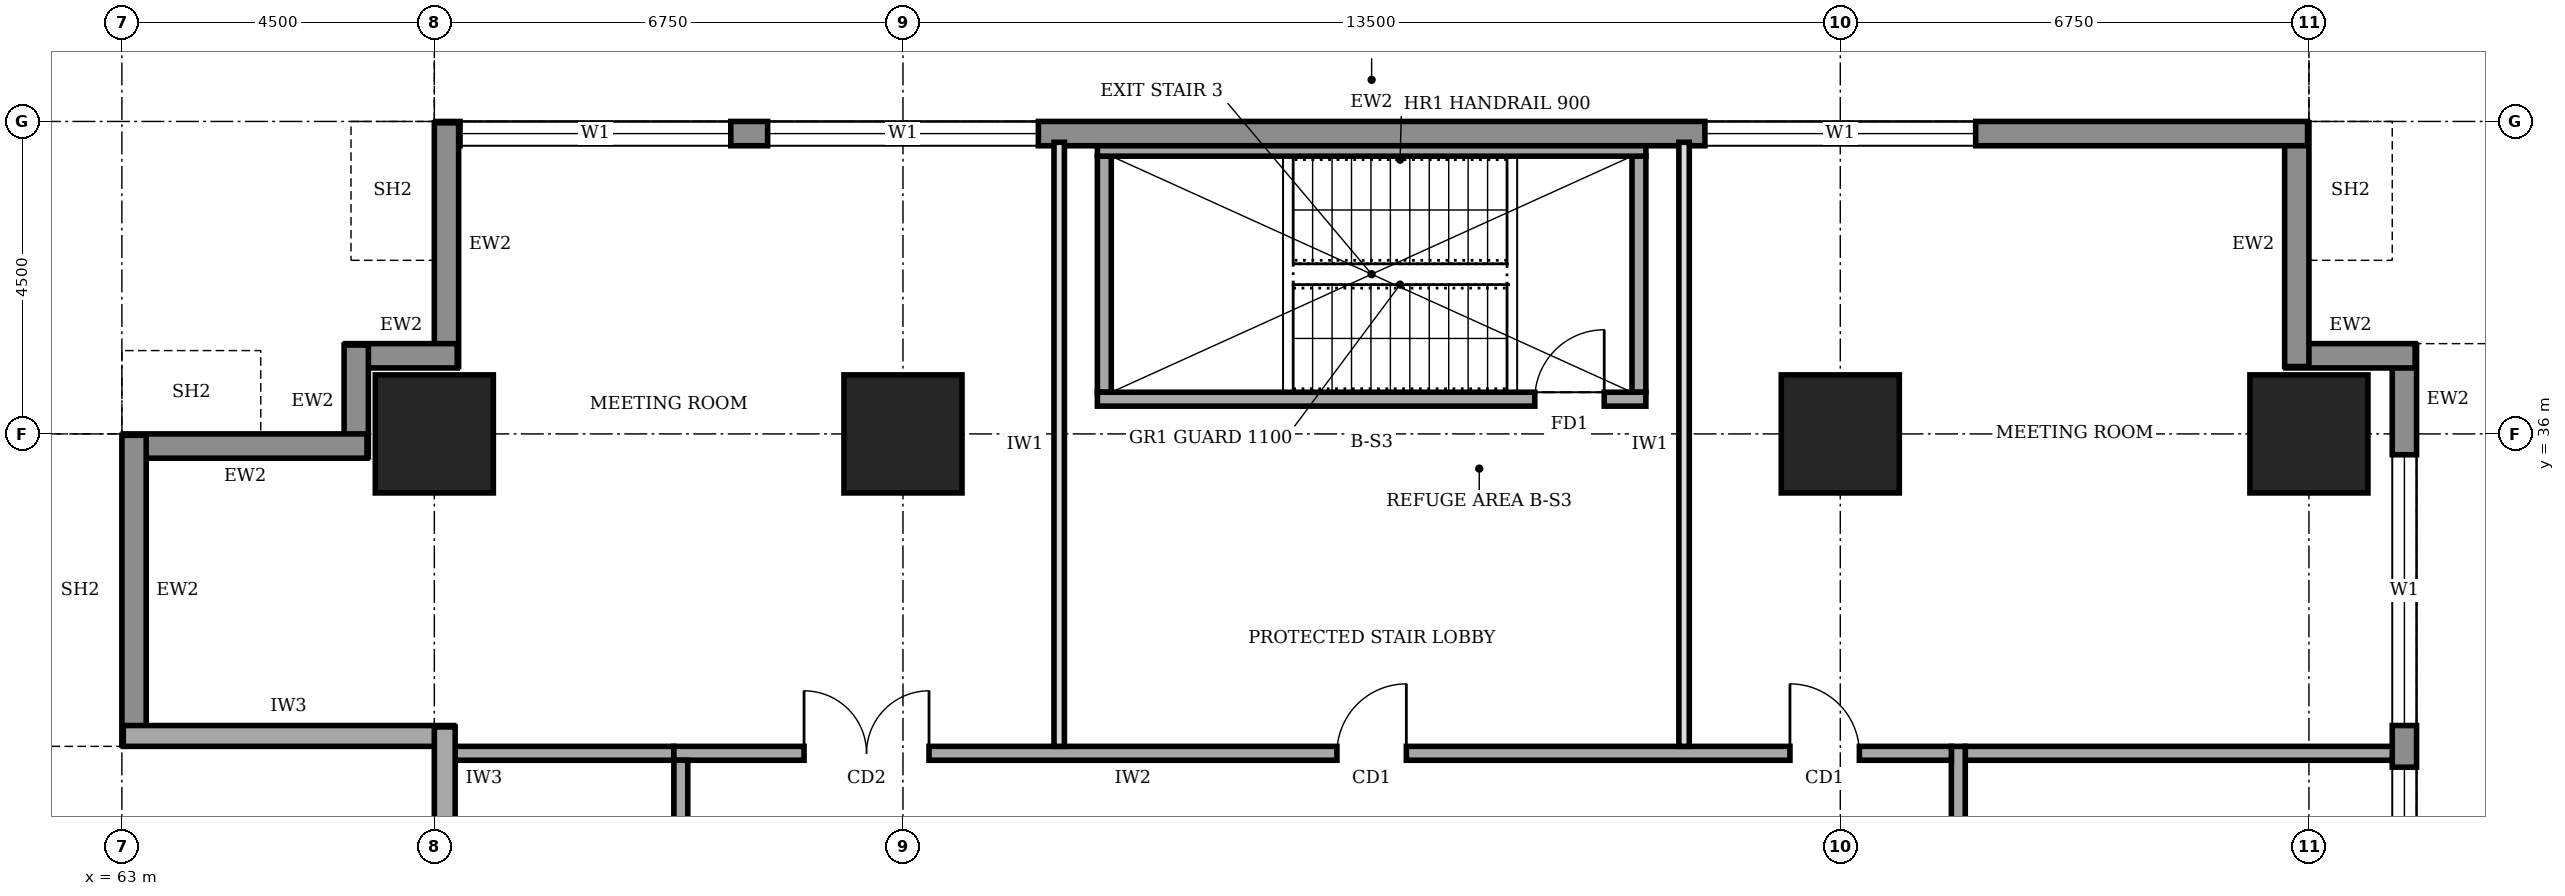
"""IFC4 building model, lengths in metres.
Left out: names, types, materials, properties, quantities, classifications, styles, units other than length and angle.
Written with IfcOpenShell. Run it as: python <this file> out.ifc"""

import sys

from ifc_helpers import new_model, si_unit, direction, frame, frame_2d, origin, origin_2d, place, context, subcontext, project, spatial, rectangle, extrude, element, fill, save


model = new_model("IFC4")
c1 = context("Model", 3, precision=1e-05, world=origin(), true_north=direction((0.0, 1.0)))
c2 = subcontext(c1, "Body", "Model", "MODEL_VIEW")
j1 = project(units=[si_unit("LENGTHUNIT", "METRE"), si_unit("PLANEANGLEUNIT", "RADIAN")], contexts=[c1])
p1 = place(None, origin())
s1 = spatial("IfcSite", under=j1, at=p1, CompositionType="ELEMENT")
p2 = place(p1, origin())
s2 = spatial("IfcBuilding", under=s1, at=p2, CompositionType="ELEMENT")
p3 = place(p2, frame((0.0, 0.0, 121.0)))
s3 = spatial("IfcBuildingStorey", under=s2, at=p3, CompositionType="ELEMENT", Elevation=121.0)
for number, where, z_axis, x_axis in (
    (1, (67.5, 36.0, 0.0), (0.0, 0.0, 1.0), (1.0, 0.0, 0.0)),
    (2, (74.25, 36.0, 0.0), (0.0, 0.0, 1.0), (1.0, 0.0, 0.0)),
    (3, (87.75, 36.0, 0.0), (0.0, 0.0, 1.0), (1.0, 0.0, 0.0)),
    (4, (94.5, 36.0, 0.0), (0.0, 0.0, 1.0), (1.0, 0.0, 0.0)),
):
    element("IfcColumn", number, at=place(p3, frame(where, z_axis=z_axis, x_axis=x_axis)), inside=s3, PredefinedType="COLUMN", context=c2, shape_type="SweptSolid", body=[
        extrude(rectangle(XDim=1.7, YDim=1.7, at=origin_2d()), origin(), (0.0, 0.0, 1.0), 4.0),
    ])
p4 = place(p3, frame((95.875, 3.32, 0.0), z_axis=(0.0, 0.0, 1.0), x_axis=(0.0, 1.0, 0.0)))
e5 = element("IfcWall", 5, at=p4, inside=s3, PredefinedType="STANDARD", context=c2, shape_type="SweptSolid", body=[
    extrude(rectangle(XDim=33.96, YDim=0.35, at=frame_2d((16.98, 0.0))), origin(), (0.0, 0.0, 1.0), 3.75),
])
p5 = place(p4, frame((1.48, 0.0, 0.9)))
e6 = element("IfcOpeningElement", 6, at=p5, cuts=e5, PredefinedType="OPENING", context=c2, shape_type="SweptSolid", body=[
    extrude(rectangle(XDim=3.9, YDim=2.2, at=frame_2d((1.95, 1.1))), frame((0.0, 0.185, 0.0), z_axis=(0.0, -1.0, 0.0), x_axis=(1.0, 0.0, 0.0)), (0.0, 0.0, 1.0), 0.37),
])
p6 = place(p4, frame((5.98, 0.0, 0.9)))
e7 = element("IfcOpeningElement", 7, at=p6, cuts=e5, PredefinedType="OPENING", context=c2, shape_type="SweptSolid", body=[
    extrude(rectangle(XDim=3.9, YDim=2.2, at=frame_2d((1.95, 1.1))), frame((0.0, 0.185, 0.0), z_axis=(0.0, -1.0, 0.0), x_axis=(1.0, 0.0, 0.0)), (0.0, 0.0, 1.0), 0.37),
])
p7 = place(p4, frame((10.48, 0.0, 0.9)))
e8 = element("IfcOpeningElement", 8, at=p7, cuts=e5, PredefinedType="OPENING", context=c2, shape_type="SweptSolid", body=[
    extrude(rectangle(XDim=3.9, YDim=2.2, at=frame_2d((1.95, 1.1))), frame((0.0, 0.185, 0.0), z_axis=(0.0, -1.0, 0.0), x_axis=(1.0, 0.0, 0.0)), (0.0, 0.0, 1.0), 0.37),
])
p8 = place(p4, frame((14.98, 0.0, 0.9)))
e9 = element("IfcOpeningElement", 9, at=p8, cuts=e5, PredefinedType="OPENING", context=c2, shape_type="SweptSolid", body=[
    extrude(rectangle(XDim=3.9, YDim=2.2, at=frame_2d((1.95, 1.1))), frame((0.0, 0.185, 0.0), z_axis=(0.0, -1.0, 0.0), x_axis=(1.0, 0.0, 0.0)), (0.0, 0.0, 1.0), 0.37),
])
p9 = place(p4, frame((19.48, 0.0, 0.9)))
e10 = element("IfcOpeningElement", 10, at=p9, cuts=e5, PredefinedType="OPENING", context=c2, shape_type="SweptSolid", body=[
    extrude(rectangle(XDim=3.9, YDim=2.2, at=frame_2d((1.95, 1.1))), frame((0.0, 0.185, 0.0), z_axis=(0.0, -1.0, 0.0), x_axis=(1.0, 0.0, 0.0)), (0.0, 0.0, 1.0), 0.37),
])
p10 = place(p4, frame((23.98, 0.0, 0.9)))
e11 = element("IfcOpeningElement", 11, at=p10, cuts=e5, PredefinedType="OPENING", context=c2, shape_type="SweptSolid", body=[
    extrude(rectangle(XDim=3.9, YDim=2.2, at=frame_2d((1.95, 1.1))), frame((0.0, 0.185, 0.0), z_axis=(0.0, -1.0, 0.0), x_axis=(1.0, 0.0, 0.0)), (0.0, 0.0, 1.0), 0.37),
])
p11 = place(p4, frame((28.48, 0.0, 0.9)))
e12 = element("IfcOpeningElement", 12, at=p11, cuts=e5, PredefinedType="OPENING", context=c2, shape_type="SweptSolid", body=[
    extrude(rectangle(XDim=3.9, YDim=2.2, at=frame_2d((1.95, 1.1))), frame((0.0, 0.185, 0.0), z_axis=(0.0, -1.0, 0.0), x_axis=(1.0, 0.0, 0.0)), (0.0, 0.0, 1.0), 0.37),
])
p12 = place(p3, frame((96.03, 37.125, 0.0), z_axis=(0.0, 0.0, 1.0), x_axis=(-1.0, 0.0, 0.0)))
e13 = element("IfcWall", 13, at=p12, inside=s3, PredefinedType="STANDARD", context=c2, shape_type="SweptSolid", body=[
    extrude(rectangle(XDim=1.86, YDim=0.35, at=frame_2d((0.93, 0.0))), origin(), (0.0, 0.0, 1.0), 3.75),
])
p13 = place(p3, frame((94.325, 36.97, 0.0), z_axis=(0.0, 0.0, 1.0), x_axis=(0.0, 1.0, 0.0)))
e14 = element("IfcWall", 14, at=p13, inside=s3, PredefinedType="STANDARD", context=c2, shape_type="SweptSolid", body=[
    extrude(rectangle(XDim=3.51, YDim=0.35, at=frame_2d((1.755, 0.0))), origin(), (0.0, 0.0, 1.0), 2.85),
])
p14 = place(p3, frame((94.48, 40.325, 0.0), z_axis=(0.0, 0.0, 1.0), x_axis=(-1.0, 0.0, 0.0)))
e15 = element("IfcWall", 15, at=p14, inside=s3, PredefinedType="STANDARD", context=c2, shape_type="SweptSolid", body=[
    extrude(rectangle(XDim=26.96, YDim=0.35, at=frame_2d((13.48, 0.0))), origin(), (0.0, 0.0, 1.0), 3.75),
])
p15 = place(p14, frame((22.71, 0.0, 0.9)))
e16 = element("IfcOpeningElement", 16, at=p15, cuts=e15, PredefinedType="OPENING", context=c2, shape_type="SweptSolid", body=[
    extrude(rectangle(XDim=3.9, YDim=2.2, at=frame_2d((1.95, 1.1))), frame((0.0, 0.185, 0.0), z_axis=(0.0, -1.0, 0.0), x_axis=(1.0, 0.0, 0.0)), (0.0, 0.0, 1.0), 0.37),
])
p16 = place(p14, frame((18.28, 0.0, 0.9)))
e17 = element("IfcOpeningElement", 17, at=p16, cuts=e15, PredefinedType="OPENING", context=c2, shape_type="SweptSolid", body=[
    extrude(rectangle(XDim=3.9, YDim=2.2, at=frame_2d((1.95, 1.1))), frame((0.0, 0.185, 0.0), z_axis=(0.0, -1.0, 0.0), x_axis=(1.0, 0.0, 0.0)), (0.0, 0.0, 1.0), 0.37),
])
p17 = place(p14, frame((4.78, 0.0, 0.9)))
e18 = element("IfcOpeningElement", 18, at=p17, cuts=e15, PredefinedType="OPENING", context=c2, shape_type="SweptSolid", body=[
    extrude(rectangle(XDim=3.9, YDim=2.2, at=frame_2d((1.95, 1.1))), frame((0.0, 0.185, 0.0), z_axis=(0.0, -1.0, 0.0), x_axis=(1.0, 0.0, 0.0)), (0.0, 0.0, 1.0), 0.37),
])
p18 = place(p3, frame((67.675, 40.48, 0.0), z_axis=(0.0, 0.0, 1.0), x_axis=(0.0, -1.0, 0.0)))
e19 = element("IfcWall", 19, at=p18, inside=s3, PredefinedType="STANDARD", context=c2, shape_type="SweptSolid", body=[
    extrude(rectangle(XDim=3.51, YDim=0.35, at=frame_2d((1.755, 0.0))), origin(), (0.0, 0.0, 1.0), 2.85),
])
for number, where, z_axis, x_axis in (
    (20, (67.83, 37.125, 0.0), (0.0, 0.0, 1.0), (-1.0, 0.0, 0.0)),
    (21, (66.375, 37.28, 0.0), (0.0, 0.0, 1.0), (0.0, -1.0, 0.0)),
):
    element("IfcWall", number, at=place(p3, frame(where, z_axis=z_axis, x_axis=x_axis)), inside=s3, PredefinedType="STANDARD", context=c2, shape_type="SweptSolid", body=[
        extrude(rectangle(XDim=1.61, YDim=0.35, at=frame_2d((0.805, 0.0))), origin(), (0.0, 0.0, 1.0), 3.75),
    ])
p19 = place(p3, frame((66.53, 35.825, 0.0), z_axis=(0.0, 0.0, 1.0), x_axis=(-1.0, 0.0, 0.0)))
e22 = element("IfcWall", 22, at=p19, inside=s3, PredefinedType="STANDARD", context=c2, shape_type="SweptSolid", body=[
    extrude(rectangle(XDim=3.51, YDim=0.35, at=frame_2d((1.755, 0.0))), origin(), (0.0, 0.0, 1.0), 2.85),
])
p20 = place(p3, frame((63.175, 35.98, 0.0), z_axis=(0.0, 0.0, 1.0), x_axis=(0.0, -1.0, 0.0)))
e23 = element("IfcWall", 23, at=p20, inside=s3, PredefinedType="STANDARD", context=c2, shape_type="SweptSolid", body=[
    extrude(rectangle(XDim=4.46, YDim=0.35, at=frame_2d((2.23, 0.0))), origin(), (0.0, 0.0, 1.0), 3.75),
])
p21 = place(p3, frame((63.02, 31.65, 0.0), z_axis=(0.0, 0.0, 1.0), x_axis=(1.0, 0.0, 0.0)))
e24 = element("IfcWall", 24, at=p21, inside=s3, PredefinedType="SOLIDWALL", context=c2, shape_type="SweptSolid", body=[
    extrude(rectangle(XDim=4.76, YDim=0.3, at=frame_2d((2.38, 0.0))), origin(), (0.0, 0.0, 1.0), 3.75),
])
p22 = place(p3, frame((67.65, 31.78, 0.0), z_axis=(0.0, 0.0, 1.0), x_axis=(0.0, -1.0, 0.0)))
e25 = element("IfcWall", 25, at=p22, inside=s3, PredefinedType="SOLIDWALL", context=c2, shape_type="SweptSolid", body=[
    extrude(rectangle(XDim=1.48, YDim=0.3, at=frame_2d((0.74, 0.0))), origin(), (0.0, 0.0, 1.0), 2.65),
])
p23 = place(p3, frame((89.45, 9.2, 0.0), z_axis=(0.0, 0.0, 1.0), x_axis=(0.0, 1.0, 0.0)))
e26 = element("IfcWall", 26, at=p23, inside=s3, PredefinedType="SOLIDWALL", context=c2, shape_type="SweptSolid", body=[
    extrude(rectangle(XDim=22.3, YDim=0.2, at=frame_2d((11.15, 0.0))), origin(), (0.0, 0.0, 1.0), 3.75),
])
p24 = place(p23, frame((1.625, 0.0, 0.0)))
e27 = element("IfcOpeningElement", 27, at=p24, cuts=e26, PredefinedType="OPENING", context=c2, shape_type="SweptSolid", body=[
    extrude(rectangle(XDim=1.0, YDim=2.1, at=frame_2d((0.5, 1.05))), frame((0.0, 0.11, 0.0), z_axis=(0.0, -1.0, 0.0), x_axis=(1.0, 0.0, 0.0)), (0.0, 0.0, 1.0), 0.22),
])
p25 = place(p23, frame((5.05, 0.0, 0.0)))
e28 = element("IfcOpeningElement", 28, at=p25, cuts=e26, PredefinedType="OPENING", context=c2, shape_type="SweptSolid", body=[
    extrude(rectangle(XDim=1.0, YDim=2.1, at=frame_2d((0.5, 1.05))), frame((0.0, 0.11, 0.0), z_axis=(0.0, -1.0, 0.0), x_axis=(1.0, 0.0, 0.0)), (0.0, 0.0, 1.0), 0.22),
])
p26 = place(p23, frame((8.075, 0.0, 0.0)))
e29 = element("IfcOpeningElement", 29, at=p26, cuts=e26, PredefinedType="OPENING", context=c2, shape_type="SweptSolid", body=[
    extrude(rectangle(XDim=0.9, YDim=2.1, at=frame_2d((0.45, 1.05))), frame((0.0, 0.11, 0.0), z_axis=(0.0, -1.0, 0.0), x_axis=(1.0, 0.0, 0.0)), (0.0, 0.0, 1.0), 0.22),
])
p27 = place(p23, frame((11.05, 0.0, 0.0)))
e30 = element("IfcOpeningElement", 30, at=p27, cuts=e26, PredefinedType="OPENING", context=c2, shape_type="SweptSolid", body=[
    extrude(rectangle(XDim=0.9, YDim=2.1, at=frame_2d((0.45, 1.05))), frame((0.0, 0.11, 0.0), z_axis=(0.0, -1.0, 0.0), x_axis=(1.0, 0.0, 0.0)), (0.0, 0.0, 1.0), 0.22),
])
p28 = place(p23, frame((15.675, 0.0, 0.0)))
e31 = element("IfcOpeningElement", 31, at=p28, cuts=e26, PredefinedType="OPENING", context=c2, shape_type="SweptSolid", body=[
    extrude(rectangle(XDim=0.9, YDim=2.1, at=frame_2d((0.45, 1.05))), frame((0.0, 0.11, 0.0), z_axis=(0.0, -1.0, 0.0), x_axis=(1.0, 0.0, 0.0)), (0.0, 0.0, 1.0), 0.22),
])
p29 = place(p23, frame((13.1, 0.0, 0.0)))
e32 = element("IfcOpeningElement", 32, at=p29, cuts=e26, PredefinedType="OPENING", context=c2, shape_type="SweptSolid", body=[
    extrude(rectangle(XDim=1.0, YDim=2.1, at=frame_2d((0.5, 1.05))), frame((0.0, 0.11, 0.0), z_axis=(0.0, -1.0, 0.0), x_axis=(1.0, 0.0, 0.0)), (0.0, 0.0, 1.0), 0.22),
])
p30 = place(p23, frame((19.475, 0.0, 0.0)))
e33 = element("IfcOpeningElement", 33, at=p30, cuts=e26, PredefinedType="OPENING", context=c2, shape_type="SweptSolid", body=[
    extrude(rectangle(XDim=1.0, YDim=2.1, at=frame_2d((0.5, 1.05))), frame((0.0, 0.11, 0.0), z_axis=(0.0, -1.0, 0.0), x_axis=(1.0, 0.0, 0.0)), (0.0, 0.0, 1.0), 0.22),
])
p31 = place(p3, frame((89.35, 31.4, 0.0), z_axis=(0.0, 0.0, 1.0), x_axis=(-1.0, 0.0, 0.0)))
e34 = element("IfcWall", 34, at=p31, inside=s3, PredefinedType="SOLIDWALL", context=c2, shape_type="SweptSolid", body=[
    extrude(rectangle(XDim=18.4, YDim=0.2, at=frame_2d((9.2, 0.0))), origin(), (0.0, 0.0, 1.0), 3.75),
])
p32 = place(p31, frame((14.725, 0.0, 0.0)))
e35 = element("IfcOpeningElement", 35, at=p32, cuts=e34, PredefinedType="OPENING", context=c2, shape_type="SweptSolid", body=[
    extrude(rectangle(XDim=1.8, YDim=2.1, at=frame_2d((0.9, 1.05))), frame((0.0, 0.11, 0.0), z_axis=(0.0, -1.0, 0.0), x_axis=(1.0, 0.0, 0.0)), (0.0, 0.0, 1.0), 0.22),
])
p33 = place(p31, frame((7.85, 0.0, 0.0)))
e36 = element("IfcOpeningElement", 36, at=p33, cuts=e34, PredefinedType="OPENING", context=c2, shape_type="SweptSolid", body=[
    extrude(rectangle(XDim=1.0, YDim=2.1, at=frame_2d((0.5, 1.05))), frame((0.0, 0.11, 0.0), z_axis=(0.0, -1.0, 0.0), x_axis=(1.0, 0.0, 0.0)), (0.0, 0.0, 1.0), 0.22),
])
p34 = place(p31, frame((1.325, 0.0, 0.0)))
e37 = element("IfcOpeningElement", 37, at=p34, cuts=e34, PredefinedType="OPENING", context=c2, shape_type="SweptSolid", body=[
    extrude(rectangle(XDim=1.0, YDim=2.1, at=frame_2d((0.5, 1.05))), frame((0.0, 0.11, 0.0), z_axis=(0.0, -1.0, 0.0), x_axis=(1.0, 0.0, 0.0)), (0.0, 0.0, 1.0), 0.22),
])
p35 = place(p3, frame((71.05, 31.3, 0.0), z_axis=(0.0, 0.0, 1.0), x_axis=(0.0, -1.0, 0.0)))
e38 = element("IfcWall", 38, at=p35, inside=s3, PredefinedType="SOLIDWALL", context=c2, shape_type="SweptSolid", body=[
    extrude(rectangle(XDim=22.3, YDim=0.2, at=frame_2d((11.15, 0.0))), origin(), (0.0, 0.0, 1.0), 3.75),
])
p36 = place(p35, frame((10.15, 0.0, 0.0)))
e39 = element("IfcOpeningElement", 39, at=p36, cuts=e38, PredefinedType="OPENING", context=c2, shape_type="SweptSolid", body=[
    extrude(rectangle(XDim=1.8, YDim=2.1, at=frame_2d((0.9, 1.05))), frame((0.0, 0.11, 0.0), z_axis=(0.0, -1.0, 0.0), x_axis=(1.0, 0.0, 0.0)), (0.0, 0.0, 1.0), 0.22),
])
p37 = place(p3, frame((67.8, 31.4, 0.0), z_axis=(0.0, 0.0, 1.0), x_axis=(1.0, 0.0, 0.0)))
e40 = element("IfcWall", 40, at=p37, inside=s3, PredefinedType="SOLIDWALL", context=c2, shape_type="SweptSolid", body=[
    extrude(rectangle(XDim=3.15, YDim=0.2, at=frame_2d((1.575, 0.0))), origin(), (0.0, 0.0, 1.0), 3.75),
])
p38 = place(p3, frame((89.55, 31.4, 0.0), z_axis=(0.0, 0.0, 1.0), x_axis=(1.0, 0.0, 0.0)))
e41 = element("IfcWall", 41, at=p38, inside=s3, PredefinedType="SOLIDWALL", context=c2, shape_type="SweptSolid", body=[
    extrude(rectangle(XDim=6.2, YDim=0.2, at=frame_2d((3.1, 0.0))), origin(), (0.0, 0.0, 1.0), 3.75),
])
for number, where, z_axis, x_axis in (
    (42, (76.5, 31.5, 0.0), (0.0, 0.0, 1.0), (0.0, 1.0, 0.0)),
    (43, (85.5, 31.5, 0.0), (0.0, 0.0, 1.0), (0.0, 1.0, 0.0)),
):
    element("IfcWall", number, at=place(p3, frame(where, z_axis=z_axis, x_axis=x_axis)), inside=s3, PredefinedType="PARTITIONING", context=c2, shape_type="SweptSolid", body=[
        extrude(rectangle(XDim=8.7, YDim=0.15, at=frame_2d((4.35, 0.0))), origin(), (0.0, 0.0, 1.0), 3.75),
    ])
p39 = place(p3, frame((77.05, 36.5, 0.0), z_axis=(0.0, 0.0, 1.0), x_axis=(1.0, 0.0, 0.0)))
e44 = element("IfcWall", 44, at=p39, inside=s3, PredefinedType="SOLIDWALL", context=c2, shape_type="SweptSolid", body=[
    extrude(rectangle(XDim=7.9, YDim=0.2, at=frame_2d((3.95, 0.0))), origin(), (0.0, 0.0, 1.0), 3.75),
])
p40 = place(p39, frame((6.3, 0.0, 0.0)))
e45 = element("IfcOpeningElement", 45, at=p40, cuts=e44, PredefinedType="OPENING", context=c2, shape_type="SweptSolid", body=[
    extrude(rectangle(XDim=1.0, YDim=2.1, at=frame_2d((0.5, 1.05))), frame((0.0, 0.11, 0.0), z_axis=(0.0, -1.0, 0.0), x_axis=(1.0, 0.0, 0.0)), (0.0, 0.0, 1.0), 0.22),
])
p41 = place(p3, frame((77.05, 40.075, 0.0), z_axis=(0.0, 0.0, 1.0), x_axis=(1.0, 0.0, 0.0)))
e46 = element("IfcWall", 46, at=p41, inside=s3, PredefinedType="SOLIDWALL", context=c2, shape_type="SweptSolid", body=[
    extrude(rectangle(XDim=7.9, YDim=0.15, at=frame_2d((3.95, 0.0))), origin(), (0.0, 0.0, 1.0), 3.75),
])
for number, where, z_axis, x_axis in (
    (47, (77.15, 36.6, 0.0), (0.0, 0.0, 1.0), (0.0, 1.0, 0.0)),
    (48, (84.85, 36.6, 0.0), (0.0, 0.0, 1.0), (0.0, 1.0, 0.0)),
):
    element("IfcWall", number, at=place(p3, frame(where, z_axis=z_axis, x_axis=x_axis)), inside=s3, PredefinedType="SOLIDWALL", context=c2, shape_type="SweptSolid", body=[
        extrude(rectangle(XDim=3.4, YDim=0.2, at=frame_2d((1.7, 0.0))), origin(), (0.0, 0.0, 1.0), 3.75),
    ])
p42 = place(p10, origin())
e49 = element("IfcWindow", 49, at=p42, inside=s3, PartitioningType="SINGLE_PANEL", PredefinedType="WINDOW", context=c2, shape_type="SweptSolid", body=[
    extrude(rectangle(XDim=3.9, YDim=2.2, at=frame_2d((1.95, 1.1))), frame((0.0, 0.03, 0.0), z_axis=(0.0, -1.0, 0.0), x_axis=(1.0, 0.0, 0.0)), (0.0, 0.0, 1.0), 0.06),
])
fill(e11, e49)
p43 = place(p11, origin())
e50 = element("IfcWindow", 50, at=p43, inside=s3, PartitioningType="SINGLE_PANEL", PredefinedType="WINDOW", context=c2, shape_type="SweptSolid", body=[
    extrude(rectangle(XDim=3.9, YDim=2.2, at=frame_2d((1.95, 1.1))), frame((0.0, 0.03, 0.0), z_axis=(0.0, -1.0, 0.0), x_axis=(1.0, 0.0, 0.0)), (0.0, 0.0, 1.0), 0.06),
])
fill(e12, e50)
p44 = place(p15, origin())
e51 = element("IfcWindow", 51, at=p44, inside=s3, PartitioningType="SINGLE_PANEL", PredefinedType="WINDOW", context=c2, shape_type="SweptSolid", body=[
    extrude(rectangle(XDim=3.9, YDim=2.2, at=frame_2d((1.95, 1.1))), frame((0.0, 0.03, 0.0), z_axis=(0.0, -1.0, 0.0), x_axis=(1.0, 0.0, 0.0)), (0.0, 0.0, 1.0), 0.06),
])
fill(e16, e51)
p45 = place(p16, origin())
e52 = element("IfcWindow", 52, at=p45, inside=s3, PartitioningType="SINGLE_PANEL", PredefinedType="WINDOW", context=c2, shape_type="SweptSolid", body=[
    extrude(rectangle(XDim=3.9, YDim=2.2, at=frame_2d((1.95, 1.1))), frame((0.0, 0.03, 0.0), z_axis=(0.0, -1.0, 0.0), x_axis=(1.0, 0.0, 0.0)), (0.0, 0.0, 1.0), 0.06),
])
fill(e17, e52)
p46 = place(p17, origin())
e53 = element("IfcWindow", 53, at=p46, inside=s3, PartitioningType="SINGLE_PANEL", PredefinedType="WINDOW", context=c2, shape_type="SweptSolid", body=[
    extrude(rectangle(XDim=3.9, YDim=2.2, at=frame_2d((1.95, 1.1))), frame((0.0, 0.03, 0.0), z_axis=(0.0, -1.0, 0.0), x_axis=(1.0, 0.0, 0.0)), (0.0, 0.0, 1.0), 0.06),
])
fill(e18, e53)
p47 = place(p32, frame((1.8, 0.0, 0.0), z_axis=(0.0, 0.0, 1.0), x_axis=(-1.0, 0.0, 0.0)))
e54 = element("IfcDoor", 54, at=p47, inside=s3, OperationType="DOUBLE_DOOR_SINGLE_SWING", PredefinedType="DOOR", context=c2, shape_type="SweptSolid", body=[
    extrude(rectangle(XDim=1.8, YDim=2.1, at=frame_2d((0.9, 1.05))), frame((0.0, 0.025, 0.0), z_axis=(0.0, -1.0, 0.0), x_axis=(1.0, 0.0, 0.0)), (0.0, 0.0, 1.0), 0.05),
])
fill(e35, e54)
p48 = place(p33, frame((1.0, 0.0, 0.0), z_axis=(0.0, 0.0, 1.0), x_axis=(-1.0, 0.0, 0.0)))
e55 = element("IfcDoor", 55, at=p48, inside=s3, OperationType="SINGLE_SWING_RIGHT", PredefinedType="DOOR", context=c2, shape_type="SweptSolid", body=[
    extrude(rectangle(XDim=1.0, YDim=2.1, at=frame_2d((0.5, 1.05))), frame((0.0, 0.025, 0.0), z_axis=(0.0, -1.0, 0.0), x_axis=(1.0, 0.0, 0.0)), (0.0, 0.0, 1.0), 0.05),
])
fill(e36, e55)
p49 = place(p34, frame((1.0, 0.0, 0.0), z_axis=(0.0, 0.0, 1.0), x_axis=(-1.0, 0.0, 0.0)))
e56 = element("IfcDoor", 56, at=p49, inside=s3, OperationType="SINGLE_SWING_LEFT", PredefinedType="DOOR", context=c2, shape_type="SweptSolid", body=[
    extrude(rectangle(XDim=1.0, YDim=2.1, at=frame_2d((0.5, 1.05))), frame((0.0, 0.025, 0.0), z_axis=(0.0, -1.0, 0.0), x_axis=(1.0, 0.0, 0.0)), (0.0, 0.0, 1.0), 0.05),
])
fill(e37, e56)
p50 = place(p40, origin())
e57 = element("IfcDoor", 57, at=p50, inside=s3, OperationType="SINGLE_SWING_RIGHT", PredefinedType="DOOR", context=c2, shape_type="SweptSolid", body=[
    extrude(rectangle(XDim=1.0, YDim=2.1, at=frame_2d((0.5, 1.05))), frame((0.0, 0.025, 0.0), z_axis=(0.0, -1.0, 0.0), x_axis=(1.0, 0.0, 0.0)), (0.0, 0.0, 1.0), 0.05),
])
fill(e45, e57)
save(model, sys.argv[1])
